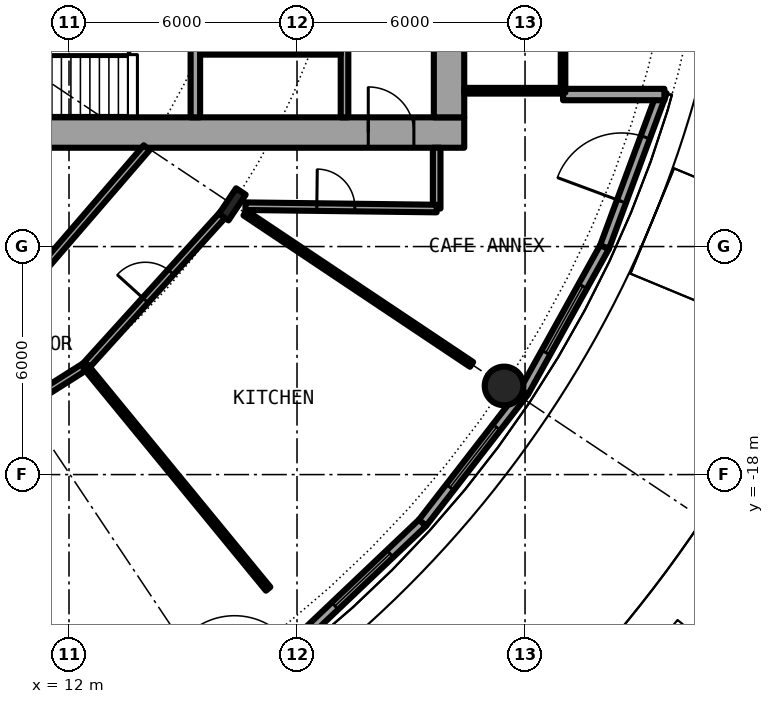
"""IFC4 building model, lengths in metres.
Left out: names, types, materials, properties, quantities, classifications, styles, units other than length and angle.
Written with IfcOpenShell. Run it as: python <this file> out.ifc"""

import sys

from ifc_helpers import new_model, si_unit, direction, frame, frame_2d, origin, origin_2d, place, context, subcontext, project, spatial, rectangle, hollow_circle, i_section, extrude, element, fill, save


model = new_model("IFC4")
c1 = context("Model", 3, precision=1e-05, world=origin(), true_north=direction((0.0, 1.0)))
c2 = subcontext(c1, "Body", "Model", "MODEL_VIEW")
j1 = project(units=[si_unit("LENGTHUNIT", "METRE"), si_unit("PLANEANGLEUNIT", "RADIAN")], contexts=[c1])
p1 = place(None, origin())
s1 = spatial("IfcSite", under=j1, at=p1, CompositionType="ELEMENT")
p2 = place(p1, origin())
s2 = spatial("IfcBuilding", under=s1, at=p2, CompositionType="ELEMENT")
p3 = place(p2, frame((0.0, 0.0, 9.6)))
s3 = spatial("IfcBuildingStorey", under=s2, at=p3, CompositionType="ELEMENT", Elevation=9.6)
p4 = place(p3, frame((23.448, -15.667, 0.0), z_axis=(0.0, 0.0, 1.0), x_axis=(1.0, 0.0, 0.0)))
e1 = element("IfcColumn", 1, at=p4, inside=s3, PredefinedType="COLUMN", context=c2, shape_type="SweptSolid", body=[
    extrude(hollow_circle(Radius=0.508, WallThickness=0.05, at=origin_2d()), origin(), (0.0, 0.0, 1.0), 4.5),
])
p5 = place(p3, frame((16.297, -10.889, 0.0), z_axis=(0.0, 0.0, 1.0), x_axis=(0.831469612303, -0.55557023302, 0.0)))
e2 = element("IfcColumn", 2, at=p5, inside=s3, PredefinedType="COLUMN", context=c2, shape_type="SweptSolid", body=[
    extrude(i_section(OverallWidth=0.303, OverallDepth=0.814, WebThickness=0.021, FlangeThickness=0.04, FilletRadius=0.03, at=origin_2d()), origin(), (0.0, 0.0, 1.0), 4.5),
])
p6 = place(p3, frame((18.143, -22.27, 0.0), z_axis=(0.0, 0.0, 1.0), x_axis=(0.725101501119, 0.68864200647, 0.0)))
e3 = element("IfcWall", 3, at=p6, inside=s3, PredefinedType="SOLIDWALL", context=c2, shape_type="SweptSolid", body=[
    extrude(rectangle(XDim=4.359, YDim=0.25, at=frame_2d((2.18, 0.0))), origin(), (0.0, 0.0, 1.0), 4.05),
])
p7 = place(p6, frame((1.18, 0.0, 0.9)))
e4 = element("IfcOpeningElement", 4, at=p7, cuts=e3, PredefinedType="OPENING", context=c2, shape_type="SweptSolid", body=[
    extrude(rectangle(XDim=2.0, YDim=2.4, at=frame_2d((1.0, 1.2))), frame((0.0, 0.135, 0.0), z_axis=(0.0, -1.0, 0.0), x_axis=(1.0, 0.0, 0.0)), (0.0, 0.0, 1.0), 0.27),
])
p8 = place(p3, frame((21.304, -19.268, 0.0), z_axis=(0.0, 0.0, 1.0), x_axis=(0.612637256412, 0.790364214812, 0.0)))
e5 = element("IfcWall", 5, at=p8, inside=s3, PredefinedType="SOLIDWALL", context=c2, shape_type="SweptSolid", body=[
    extrude(rectangle(XDim=4.36, YDim=0.25, at=frame_2d((2.18, 0.0))), origin(), (0.0, 0.0, 1.0), 4.05),
])
p9 = place(p8, frame((1.18, 0.0, 0.9)))
e6 = element("IfcOpeningElement", 6, at=p9, cuts=e5, PredefinedType="OPENING", context=c2, shape_type="SweptSolid", body=[
    extrude(rectangle(XDim=2.0, YDim=2.4, at=frame_2d((1.0, 1.2))), frame((0.0, 0.135, 0.0), z_axis=(0.0, -1.0, 0.0), x_axis=(1.0, 0.0, 0.0)), (0.0, 0.0, 1.0), 0.27),
])
p10 = place(p3, frame((23.975, -15.822, 0.0), z_axis=(0.0, 0.0, 1.0), x_axis=(0.485761785263, 0.8740912355, 0.0)))
e7 = element("IfcWall", 7, at=p10, inside=s3, PredefinedType="SOLIDWALL", context=c2, shape_type="SweptSolid", body=[
    extrude(rectangle(XDim=4.36, YDim=0.25, at=frame_2d((2.18, 0.0))), origin(), (0.0, 0.0, 1.0), 4.05),
])
p11 = place(p10, frame((1.18, 0.0, 0.9)))
e8 = element("IfcOpeningElement", 8, at=p11, cuts=e7, PredefinedType="OPENING", context=c2, shape_type="SweptSolid", body=[
    extrude(rectangle(XDim=2.0, YDim=2.4, at=frame_2d((1.0, 1.2))), frame((0.0, 0.135, 0.0), z_axis=(0.0, -1.0, 0.0), x_axis=(1.0, 0.0, 0.0)), (0.0, 0.0, 1.0), 0.27),
])
p12 = place(p3, frame((26.093, -12.011, 0.0), z_axis=(0.0, 0.0, 1.0), x_axis=(0.348003729264, 0.937493148998, 0.0)))
e9 = element("IfcWall", 9, at=p12, inside=s3, PredefinedType="SOLIDWALL", context=c2, shape_type="SweptSolid", body=[
    extrude(rectangle(XDim=4.359, YDim=0.25, at=frame_2d((2.18, 0.0))), origin(), (0.0, 0.0, 1.0), 4.05),
])
p13 = place(p12, frame((1.28, 0.0, 0.0)))
e10 = element("IfcOpeningElement", 10, at=p13, cuts=e9, PredefinedType="OPENING", context=c2, shape_type="SweptSolid", body=[
    extrude(rectangle(XDim=1.8, YDim=2.2, at=frame_2d((0.9, 1.1))), frame((0.0, 0.135, 0.0), z_axis=(0.0, -1.0, 0.0), x_axis=(1.0, 0.0, 0.0)), (0.0, 0.0, 1.0), 0.27),
])
p14 = place(p3, frame((25.0, -8.0, 0.0), z_axis=(0.0, 0.0, 1.0), x_axis=(1.0, 0.0, 0.0)))
e11 = element("IfcWall", 11, at=p14, inside=s3, PredefinedType="SOLIDWALL", context=c2, shape_type="SweptSolid", body=[
    extrude(rectangle(XDim=2.667, YDim=0.3, at=frame_2d((1.333, 0.0))), origin(), (0.0, 0.0, 1.0), 4.05),
])
p15 = place(p3, frame((8.2, -9.0, 0.0), z_axis=(0.0, 0.0, 1.0), x_axis=(1.0, 0.0, 0.0)))
e12 = element("IfcWall", 12, at=p15, inside=s3, PredefinedType="SHEAR", context=c2, shape_type="SweptSolid", body=[
    extrude(rectangle(XDim=14.2, YDim=0.8, at=frame_2d((7.1, 0.0))), origin(), (0.0, 0.0, 1.0), 4.5),
])
p16 = place(p15, frame((11.675, 0.0, 0.0)))
e13 = element("IfcOpeningElement", 13, at=p16, cuts=e12, PredefinedType="OPENING", context=c2, shape_type="SweptSolid", body=[
    extrude(rectangle(XDim=1.2, YDim=2.3, at=frame_2d((0.6, 1.15))), frame((0.0, 0.41, 0.0), z_axis=(0.0, -1.0, 0.0), x_axis=(1.0, 0.0, 0.0)), (0.0, 0.0, 1.0), 0.82),
])
p17 = place(p3, frame((22.0, 8.6, 0.0), z_axis=(0.0, 0.0, 1.0), x_axis=(0.0, -1.0, 0.0)))
e14 = element("IfcWall", 14, at=p17, inside=s3, PredefinedType="SHEAR", context=c2, shape_type="SweptSolid", body=[
    extrude(rectangle(XDim=17.2, YDim=0.8, at=frame_2d((8.6, 0.0))), origin(), (0.0, 0.0, 1.0), 4.5),
])
p18 = place(p17, frame((7.7, 0.0, 0.0)))
e15 = element("IfcOpeningElement", 15, at=p18, cuts=e14, PredefinedType="OPENING", context=c2, shape_type="SweptSolid", body=[
    extrude(rectangle(XDim=1.8, YDim=2.3, at=frame_2d((0.9, 1.15))), frame((0.0, 0.41, 0.0), z_axis=(0.0, -1.0, 0.0), x_axis=(1.0, 0.0, 0.0)), (0.0, 0.0, 1.0), 0.82),
])
p19 = place(p3, frame((15.325, -8.6, 0.0), z_axis=(0.0, 0.0, 1.0), x_axis=(0.0, 1.0, 0.0)))
e16 = element("IfcWall", 16, at=p19, inside=s3, PredefinedType="SHEAR", context=c2, shape_type="SweptSolid", body=[
    extrude(rectangle(XDim=3.95, YDim=0.25, at=frame_2d((1.975, 0.0))), origin(), (0.0, 0.0, 1.0), 4.5),
])
p20 = place(p19, frame((2.025, 0.0, 0.0)))
e17 = element("IfcOpeningElement", 17, at=p20, cuts=e16, PredefinedType="OPENING", context=c2, shape_type="SweptSolid", body=[
    extrude(rectangle(XDim=1.2, YDim=2.3, at=frame_2d((0.6, 1.15))), frame((0.0, 0.135, 0.0), z_axis=(0.0, -1.0, 0.0), x_axis=(1.0, 0.0, 0.0)), (0.0, 0.0, 1.0), 0.27),
])
p21 = place(p3, frame((19.25, -8.6, 0.0), z_axis=(0.0, 0.0, 1.0), x_axis=(0.0, 1.0, 0.0)))
e18 = element("IfcWall", 18, at=p21, inside=s3, PredefinedType="SOLIDWALL", context=c2, shape_type="SweptSolid", body=[
    extrude(rectangle(XDim=7.025, YDim=0.2, at=frame_2d((3.513, 0.0))), origin(), (0.0, 0.0, 1.0), 4.05),
])
p22 = place(p21, frame((2.35, 0.0, 0.0)))
e19 = element("IfcOpeningElement", 19, at=p22, cuts=e18, PredefinedType="OPENING", context=c2, shape_type="SweptSolid", body=[
    extrude(rectangle(XDim=1.1, YDim=2.3, at=frame_2d((0.55, 1.15))), frame((0.0, 0.11, 0.0), z_axis=(0.0, -1.0, 0.0), x_axis=(1.0, 0.0, 0.0)), (0.0, 0.0, 1.0), 0.22),
])
p23 = place(p3, frame((15.45, -6.875, 0.0), z_axis=(0.0, 0.0, 1.0), x_axis=(1.0, 0.0, 0.0)))
e20 = element("IfcWall", 20, at=p23, inside=s3, PredefinedType="PARTITIONING", context=c2, shape_type="SweptSolid", body=[
    extrude(rectangle(XDim=3.7, YDim=0.15, at=frame_2d((1.85, 0.0))), origin(), (0.0, 0.0, 1.0), 4.05),
])
p24 = place(p23, frame((1.4, 0.0, 0.0)))
e21 = element("IfcOpeningElement", 21, at=p24, cuts=e20, PredefinedType="OPENING", context=c2, shape_type="SweptSolid", body=[
    extrude(rectangle(XDim=0.9, YDim=2.3, at=frame_2d((0.45, 1.15))), frame((0.0, 0.085, 0.0), z_axis=(0.0, -1.0, 0.0), x_axis=(1.0, 0.0, 0.0)), (0.0, 0.0, 1.0), 0.17),
])
p25 = place(p3, frame((22.4, -7.9, 0.0), z_axis=(0.0, 0.0, 1.0), x_axis=(1.0, 0.0, 0.0)))
e22 = element("IfcWall", 22, at=p25, inside=s3, PredefinedType="PARTITIONING", context=c2, shape_type="SweptSolid", body=[
    extrude(rectangle(XDim=2.54, YDim=0.15, at=frame_2d((1.27, 0.0))), origin(), (0.0, 0.0, 1.0), 4.05),
])
p26 = place(p3, frame((25.0, -7.95, 0.0), z_axis=(0.0, 0.0, 1.0), x_axis=(0.0, 1.0, 0.0)))
e23 = element("IfcWall", 23, at=p26, inside=s3, PredefinedType="PARTITIONING", context=c2, shape_type="SweptSolid", body=[
    extrude(rectangle(XDim=15.9, YDim=0.12, at=frame_2d((7.95, 0.0))), origin(), (0.0, 0.0, 1.0), 4.05),
])
p27 = place(p26, frame((0.95, 0.0, 0.1)))
e24 = element("IfcOpeningElement", 24, at=p27, cuts=e23, PredefinedType="OPENING", context=c2, shape_type="SweptSolid", body=[
    extrude(rectangle(XDim=14.0, YDim=3.7, at=frame_2d((7.0, 1.85))), frame((0.0, 0.07, 0.0), z_axis=(0.0, -1.0, 0.0), x_axis=(1.0, 0.0, 0.0)), (0.0, 0.0, 1.0), 0.14),
])
p28 = place(p3, frame((21.675, -11.0, 0.0), z_axis=(0.0, 0.0, 1.0), x_axis=(0.0, 1.0, 0.0)))
e25 = element("IfcWall", 25, at=p28, inside=s3, PredefinedType="PARTITIONING", context=c2, shape_type="SweptSolid", body=[
    extrude(rectangle(XDim=1.6, YDim=0.2, at=frame_2d((0.8, 0.0))), origin(), (0.0, 0.0, 1.0), 4.05),
])
p29 = place(p3, frame((10.939, -16.098, 0.0), z_axis=(0.0, 0.0, 1.0), x_axis=(0.844789975167, 0.5350980264, 0.0)))
e26 = element("IfcWall", 26, at=p29, inside=s3, PredefinedType="PARTITIONING", context=c2, shape_type="SweptSolid", body=[
    extrude(rectangle(XDim=1.77, YDim=0.2, at=frame_2d((0.885, 0.0))), origin(), (0.0, 0.0, 1.0), 3.63),
])
p30 = place(p3, frame((12.434, -15.151, 0.0), z_axis=(0.0, 0.0, 1.0), x_axis=(0.671610704694, 0.740904218736, 0.0)))
e27 = element("IfcWall", 27, at=p30, inside=s3, PredefinedType="PARTITIONING", context=c2, shape_type="SweptSolid", body=[
    extrude(rectangle(XDim=5.598, YDim=0.2, at=frame_2d((2.799, 0.0))), origin(), (0.0, 0.0, 1.0), 3.63),
])
p31 = place(p30, frame((2.346, 0.0, 0.0)))
e28 = element("IfcOpeningElement", 28, at=p31, cuts=e27, PredefinedType="OPENING", context=c2, shape_type="SweptSolid", body=[
    extrude(rectangle(XDim=1.0, YDim=2.3, at=frame_2d((0.5, 1.15))), frame((0.0, 0.11, 0.0), z_axis=(0.0, -1.0, 0.0), x_axis=(1.0, 0.0, 0.0)), (0.0, 0.0, 1.0), 0.22),
])
p32 = place(p3, frame((11.349, -12.522, 0.0), z_axis=(0.0, 0.0, 1.0), x_axis=(0.653274518104, 0.757121129012, 0.0)))
e29 = element("IfcWall", 29, at=p32, inside=s3, PredefinedType="PARTITIONING", context=c2, shape_type="SweptSolid", body=[
    extrude(rectangle(XDim=4.124, YDim=0.2, at=frame_2d((2.062, 0.0))), origin(), (0.0, 0.0, 1.0), 4.05),
])
p33 = place(p3, frame((16.643, -10.938, 0.0), z_axis=(0.0, 0.0, 1.0), x_axis=(0.999924074118, -0.012322580895, 0.0)))
e30 = element("IfcWall", 30, at=p33, inside=s3, PredefinedType="PARTITIONING", context=c2, shape_type="SweptSolid", body=[
    extrude(rectangle(XDim=5.032, YDim=0.2, at=frame_2d((2.516, 0.0))), origin(), (0.0, 0.0, 1.0), 4.05),
])
p34 = place(p33, frame((1.878, 0.0, 0.0)))
e31 = element("IfcOpeningElement", 31, at=p34, cuts=e30, PredefinedType="OPENING", context=c2, shape_type="SweptSolid", body=[
    extrude(rectangle(XDim=1.0, YDim=2.3, at=frame_2d((0.5, 1.15))), frame((0.0, 0.11, 0.0), z_axis=(0.0, -1.0, 0.0), x_axis=(1.0, 0.0, 0.0)), (0.0, 0.0, 1.0), 0.22),
])
p35 = place(p3, frame((12.434, -15.151, 0.0), z_axis=(0.0, 0.0, 1.0), x_axis=(0.634381303318, -0.773020285633, 0.0)))
e32 = element("IfcWall", 32, at=p35, inside=s3, PredefinedType="PARTITIONING", context=c2, shape_type="SweptSolid", body=[
    extrude(rectangle(XDim=7.576, YDim=0.15, at=frame_2d((3.788, 0.0))), origin(), (0.0, 0.0, 1.0), 4.05),
])
p36 = place(p3, frame((16.633, -11.118, 0.0), z_axis=(0.0, 0.0, 1.0), x_axis=(0.831415754305, -0.555650828752, 0.0)))
e33 = element("IfcWall", 33, at=p36, inside=s3, PredefinedType="PARTITIONING", context=c2, shape_type="SweptSolid", body=[
    extrude(rectangle(XDim=7.168, YDim=0.15, at=frame_2d((3.584, 0.0))), origin(), (0.0, 0.0, 1.0), 4.05),
])
p37 = place(p7, origin())
e34 = element("IfcWindow", 34, at=p37, inside=s3, PartitioningType="SINGLE_PANEL", PredefinedType="WINDOW", context=c2, shape_type="SweptSolid", body=[
    extrude(rectangle(XDim=2.0, YDim=2.4, at=frame_2d((1.0, 1.2))), frame((0.0, 0.03, 0.0), z_axis=(0.0, -1.0, 0.0), x_axis=(1.0, 0.0, 0.0)), (0.0, 0.0, 1.0), 0.06),
])
fill(e4, e34)
p38 = place(p9, origin())
e35 = element("IfcWindow", 35, at=p38, inside=s3, PartitioningType="SINGLE_PANEL", PredefinedType="WINDOW", context=c2, shape_type="SweptSolid", body=[
    extrude(rectangle(XDim=2.0, YDim=2.4, at=frame_2d((1.0, 1.2))), frame((0.0, 0.03, 0.0), z_axis=(0.0, -1.0, 0.0), x_axis=(1.0, 0.0, 0.0)), (0.0, 0.0, 1.0), 0.06),
])
fill(e6, e35)
p39 = place(p11, origin())
e36 = element("IfcWindow", 36, at=p39, inside=s3, PartitioningType="SINGLE_PANEL", PredefinedType="WINDOW", context=c2, shape_type="SweptSolid", body=[
    extrude(rectangle(XDim=2.0, YDim=2.4, at=frame_2d((1.0, 1.2))), frame((0.0, 0.03, 0.0), z_axis=(0.0, -1.0, 0.0), x_axis=(1.0, 0.0, 0.0)), (0.0, 0.0, 1.0), 0.06),
])
fill(e8, e36)
p40 = place(p13, origin())
e37 = element("IfcDoor", 37, at=p40, inside=s3, OperationType="SINGLE_SWING_LEFT", PredefinedType="DOOR", context=c2, shape_type="SweptSolid", body=[
    extrude(rectangle(XDim=1.8, YDim=2.2, at=frame_2d((0.9, 1.1))), frame((0.0, 0.025, 0.0), z_axis=(0.0, -1.0, 0.0), x_axis=(1.0, 0.0, 0.0)), (0.0, 0.0, 1.0), 0.05),
])
fill(e10, e37)
p41 = place(p24, origin())
e38 = element("IfcDoor", 38, at=p41, inside=s3, OperationType="SINGLE_SWING_LEFT", PredefinedType="DOOR", context=c2, shape_type="SweptSolid", body=[
    extrude(rectangle(XDim=0.9, YDim=2.3, at=frame_2d((0.45, 1.15))), frame((0.0, 0.025, 0.0), z_axis=(0.0, -1.0, 0.0), x_axis=(1.0, 0.0, 0.0)), (0.0, 0.0, 1.0), 0.05),
])
fill(e21, e38)
p42 = place(p16, origin())
e39 = element("IfcDoor", 39, at=p42, inside=s3, OperationType="SINGLE_SWING_LEFT", PredefinedType="DOOR", context=c2, shape_type="SweptSolid", body=[
    extrude(rectangle(XDim=1.2, YDim=2.3, at=frame_2d((0.6, 1.15))), frame((0.0, 0.025, 0.0), z_axis=(0.0, -1.0, 0.0), x_axis=(1.0, 0.0, 0.0)), (0.0, 0.0, 1.0), 0.05),
])
fill(e13, e39)
p43 = place(p27, origin())
e40 = element("IfcWindow", 40, at=p43, inside=s3, PartitioningType="SINGLE_PANEL", PredefinedType="WINDOW", context=c2, shape_type="SweptSolid", body=[
    extrude(rectangle(XDim=14.0, YDim=3.7, at=frame_2d((7.0, 1.85))), frame((0.0, 0.03, 0.0), z_axis=(0.0, -1.0, 0.0), x_axis=(1.0, 0.0, 0.0)), (0.0, 0.0, 1.0), 0.06),
])
fill(e24, e40)
p44 = place(p31, origin())
e41 = element("IfcDoor", 41, at=p44, inside=s3, OperationType="SINGLE_SWING_RIGHT", PredefinedType="DOOR", context=c2, shape_type="SweptSolid", body=[
    extrude(rectangle(XDim=1.0, YDim=2.3, at=frame_2d((0.5, 1.15))), frame((0.0, 0.025, 0.0), z_axis=(0.0, -1.0, 0.0), x_axis=(1.0, 0.0, 0.0)), (0.0, 0.0, 1.0), 0.05),
])
fill(e28, e41)
p45 = place(p34, origin())
e42 = element("IfcDoor", 42, at=p45, inside=s3, OperationType="SINGLE_SWING_LEFT", PredefinedType="DOOR", context=c2, shape_type="SweptSolid", body=[
    extrude(rectangle(XDim=1.0, YDim=2.3, at=frame_2d((0.5, 1.15))), frame((0.0, 0.025, 0.0), z_axis=(0.0, -1.0, 0.0), x_axis=(1.0, 0.0, 0.0)), (0.0, 0.0, 1.0), 0.05),
])
fill(e31, e42)
save(model, sys.argv[1])
